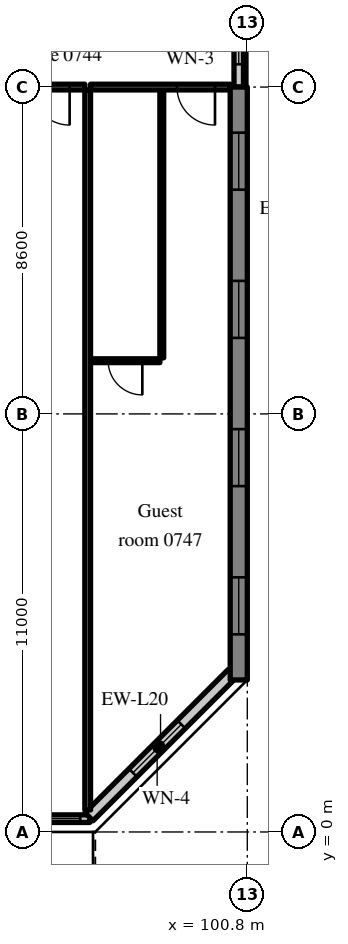
"""IFC4 building model, lengths in metres.
Left out: names, types, materials, properties, quantities, classifications, styles, units other than length and angle.
Written with IfcOpenShell. Run it as: python <this file> out.ifc"""

import sys

from ifc_helpers import new_model, si_unit, direction, frame, frame_2d, origin, place, context, subcontext, project, spatial, rectangle, extrude, source, transform, mapped, element, fill, save


model = new_model("IFC4")
c1 = context("Model", 3, precision=1e-05, world=origin(), true_north=direction((0.0, 1.0)))
c2 = subcontext(c1, "Body", "Model", "MODEL_VIEW")
j1 = project(units=[si_unit("LENGTHUNIT", "METRE"), si_unit("PLANEANGLEUNIT", "RADIAN")], contexts=[c1])
p1 = place(None, origin())
s1 = spatial("IfcSite", under=j1, at=p1, CompositionType="ELEMENT")
p2 = place(p1, origin())
s2 = spatial("IfcBuilding", under=s1, at=p2, CompositionType="ELEMENT")
p3 = place(p2, frame((0.0, 0.0, 35.4)))
s3 = spatial("IfcBuildingStorey", under=s2, at=p3, CompositionType="ELEMENT", Elevation=35.4)
m1 = source(origin(), c2, "Body", "SweptSolid", [
    extrude(rectangle(XDim=15.6, YDim=0.45, at=frame_2d((7.8, 0.0))), origin(), (0.0, 0.0, 1.0), 3.52),
])
p4 = place(p3, frame((100.575, 4.0, 0.0), z_axis=(0.0, 0.0, 1.0), x_axis=(0.0, 1.0, 0.0)))
e1 = element("IfcWall", 1, at=p4, inside=s3, PredefinedType="SHEAR", context=c2, shape_type="MappedRepresentation", body=[
    mapped(m1, transform((0.0, 0.0, 0.0), scale=1.0)),
])
m2 = source(origin(), c2, "Body", "SweptSolid", [
    extrude(rectangle(XDim=1.5, YDim=1.5, at=frame_2d((0.75, 0.75))), frame((0.0, 0.235, 0.0), z_axis=(0.0, -1.0, 0.0), x_axis=(1.0, 0.0, 0.0)), (0.0, 0.0, 1.0), 0.47),
])
p5 = place(p4, frame((1.2, 0.0, 0.9)))
e2 = element("IfcOpeningElement", 2, at=p5, cuts=e1, PredefinedType="OPENING", context=c2, shape_type="MappedRepresentation", body=[
    mapped(m2, transform((0.0, 0.0, 0.0), scale=1.0)),
])
p6 = place(p4, frame((5.1, 0.0, 0.9)))
e3 = element("IfcOpeningElement", 3, at=p6, cuts=e1, PredefinedType="OPENING", context=c2, shape_type="MappedRepresentation", body=[
    mapped(m2, transform((0.0, 0.0, 0.0), scale=1.0)),
])
p7 = place(p4, frame((9.0, 0.0, 0.9)))
e4 = element("IfcOpeningElement", 4, at=p7, cuts=e1, PredefinedType="OPENING", context=c2, shape_type="MappedRepresentation", body=[
    mapped(m2, transform((0.0, 0.0, 0.0), scale=1.0)),
])
p8 = place(p4, frame((12.9, 0.0, 0.9)))
e5 = element("IfcOpeningElement", 5, at=p8, cuts=e1, PredefinedType="OPENING", context=c2, shape_type="MappedRepresentation", body=[
    mapped(m2, transform((0.0, 0.0, 0.0), scale=1.0)),
])
m3 = source(origin(), c2, "Body", "SweptSolid", [
    extrude(rectangle(XDim=4.03, YDim=0.2, at=frame_2d((2.015, 0.0))), origin(), (0.0, 0.0, 1.0), 2.77),
])
p9 = place(p3, frame((92.625, 0.35, 0.0), z_axis=(0.0, 0.0, 1.0), x_axis=(1.0, 0.0, 0.0)))
e6 = element("IfcWall", 6, at=p9, inside=s3, PredefinedType="SOLIDWALL", context=c2, shape_type="MappedRepresentation", body=[
    mapped(m3, transform((0.0, 0.0, 0.0), scale=1.0)),
])
m4 = source(origin(), c2, "Body", "SweptSolid", [
    extrude(rectangle(XDim=1.2, YDim=2.4, at=frame_2d((0.6, 1.2))), frame((0.0, 0.11, 0.0), z_axis=(0.0, -1.0, 0.0), x_axis=(1.0, 0.0, 0.0)), (0.0, 0.0, 1.0), 0.22),
])
p10 = place(p9, frame((0.25, 0.0, 0.0)))
e7 = element("IfcOpeningElement", 7, at=p10, cuts=e6, PredefinedType="OPENING", context=c2, shape_type="MappedRepresentation", body=[
    mapped(m4, transform((0.0, 0.0, 0.0), scale=1.0)),
])
m5 = source(origin(), c2, "Body", "SweptSolid", [
    extrude(rectangle(XDim=1.5, YDim=1.5, at=frame_2d((0.75, 0.75))), frame((0.0, 0.11, 0.0), z_axis=(0.0, -1.0, 0.0), x_axis=(1.0, 0.0, 0.0)), (0.0, 0.0, 1.0), 0.22),
])
p11 = place(p9, frame((2.28, 0.0, 0.9)))
e8 = element("IfcOpeningElement", 8, at=p11, cuts=e6, PredefinedType="OPENING", context=c2, shape_type="MappedRepresentation", body=[
    mapped(m5, transform((0.0, 0.0, 0.0), scale=1.0)),
])
m6 = source(origin(), c2, "Body", "SweptSolid", [
    extrude(rectangle(XDim=5.326, YDim=0.3, at=frame_2d((2.663, 0.0))), origin(), (0.0, 0.0, 1.0), 3.52),
])
p12 = place(p3, frame((96.634, 0.4, 0.0), z_axis=(0.0, 0.0, 1.0), x_axis=(0.707083859269, 0.707129702361, 0.0)))
e9 = element("IfcWall", 9, at=p12, inside=s3, PredefinedType="SOLIDWALL", context=c2, shape_type="MappedRepresentation", body=[
    mapped(m6, transform((0.0, 0.0, 0.0), scale=1.0)),
])
m7 = source(origin(), c2, "Body", "SweptSolid", [
    extrude(rectangle(XDim=1.8, YDim=1.5, at=frame_2d((0.9, 0.75))), frame((0.0, 0.16, 0.0), z_axis=(0.0, -1.0, 0.0), x_axis=(1.0, 0.0, 0.0)), (0.0, 0.0, 1.0), 0.32),
])
p13 = place(p12, frame((1.636, 0.0, 0.9)))
e10 = element("IfcOpeningElement", 10, at=p13, cuts=e9, PredefinedType="OPENING", context=c2, shape_type="MappedRepresentation", body=[
    mapped(m7, transform((0.0, 0.0, 0.0), scale=1.0)),
])
m8 = source(origin(), c2, "Body", "SweptSolid", [
    extrude(rectangle(XDim=2.4, YDim=0.25, at=frame_2d((1.2, 0.0))), origin(), (0.0, 0.0, 1.0), 2.62),
])
p14 = place(p3, frame((100.575, 19.6, 0.0), z_axis=(0.0, 0.0, 1.0), x_axis=(0.0, 1.0, 0.0)))
e11 = element("IfcWall", 11, at=p14, inside=s3, PredefinedType="SOLIDWALL", context=c2, shape_type="MappedRepresentation", body=[
    mapped(m8, transform((0.0, 0.0, 0.0), scale=1.0)),
])
m9 = source(origin(), c2, "Body", "SweptSolid", [
    extrude(rectangle(XDim=1.2, YDim=1.5, at=frame_2d((0.6, 0.75))), frame((0.0, 0.135, 0.0), z_axis=(0.0, -1.0, 0.0), x_axis=(1.0, 0.0, 0.0)), (0.0, 0.0, 1.0), 0.27),
])
p15 = place(p14, frame((0.6, 0.0, 0.9)))
e12 = element("IfcOpeningElement", 12, at=p15, cuts=e11, PredefinedType="OPENING", context=c2, shape_type="MappedRepresentation", body=[
    mapped(m9, transform((0.0, 0.0, 0.0), scale=1.0)),
])
m10 = source(origin(), c2, "Body", "SweptSolid", [
    extrude(rectangle(XDim=3.9, YDim=0.15, at=frame_2d((1.95, 0.0))), origin(), (0.0, 0.0, 1.0), 2.82),
])
p16 = place(p3, frame((92.625, 19.6, 0.0), z_axis=(0.0, 0.0, 1.0), x_axis=(1.0, 0.0, 0.0)))
e13 = element("IfcWall", 13, at=p16, inside=s3, PredefinedType="PARTITIONING", context=c2, shape_type="MappedRepresentation", body=[
    mapped(m10, transform((0.0, 0.0, 0.0), scale=1.0)),
])
m11 = source(origin(), c2, "Body", "SweptSolid", [
    extrude(rectangle(XDim=1.0, YDim=2.1, at=frame_2d((0.5, 1.05))), frame((0.0, 0.085, 0.0), z_axis=(0.0, -1.0, 0.0), x_axis=(1.0, 0.0, 0.0)), (0.0, 0.0, 1.0), 0.17),
])
p17 = place(p16, frame((2.5, 0.0, 0.0)))
e14 = element("IfcOpeningElement", 14, at=p17, cuts=e13, PredefinedType="OPENING", context=c2, shape_type="MappedRepresentation", body=[
    mapped(m11, transform((0.0, 0.0, 0.0), scale=1.0)),
])
m12 = source(origin(), c2, "Body", "SweptSolid", [
    extrude(rectangle(XDim=7.05, YDim=0.1, at=frame_2d((3.525, 0.0))), origin(), (0.0, 0.0, 1.0), 3.52),
])
p18 = place(p3, frame((98.55, 12.475, 0.0), z_axis=(0.0, 0.0, 1.0), x_axis=(0.0, 1.0, 0.0)))
e15 = element("IfcWall", 15, at=p18, inside=s3, PredefinedType="PARTITIONING", context=c2, shape_type="MappedRepresentation", body=[
    mapped(m12, transform((0.0, 0.0, 0.0), scale=1.0)),
])
m13 = source(origin(), c2, "Body", "SweptSolid", [
    extrude(rectangle(XDim=1.825, YDim=0.1, at=frame_2d((0.913, 0.0))), origin(), (0.0, 0.0, 1.0), 3.52),
])
p19 = place(p3, frame((96.675, 12.4, 0.0), z_axis=(0.0, 0.0, 1.0), x_axis=(1.0, 0.0, 0.0)))
e16 = element("IfcWall", 16, at=p19, inside=s3, PredefinedType="PARTITIONING", context=c2, shape_type="MappedRepresentation", body=[
    mapped(m13, transform((0.0, 0.0, 0.0), scale=1.0)),
])
m14 = source(origin(), c2, "Body", "SweptSolid", [
    extrude(rectangle(XDim=0.9, YDim=2.1, at=frame_2d((0.45, 1.05))), frame((0.0, 0.06, 0.0), z_axis=(0.0, -1.0, 0.0), x_axis=(1.0, 0.0, 0.0)), (0.0, 0.0, 1.0), 0.12),
])
p20 = place(p19, frame((0.463, 0.0, 0.0)))
e17 = element("IfcOpeningElement", 17, at=p20, cuts=e16, PredefinedType="OPENING", context=c2, shape_type="MappedRepresentation", body=[
    mapped(m14, transform((0.0, 0.0, 0.0), scale=1.0)),
])
m15 = source(origin(), c2, "Body", "SweptSolid", [
    extrude(rectangle(XDim=3.675, YDim=0.15, at=frame_2d((1.837, 0.0))), origin(), (0.0, 0.0, 1.0), 2.82),
])
p21 = place(p3, frame((96.675, 19.6, 0.0), z_axis=(0.0, 0.0, 1.0), x_axis=(1.0, 0.0, 0.0)))
e18 = element("IfcWall", 18, at=p21, inside=s3, PredefinedType="PARTITIONING", context=c2, shape_type="MappedRepresentation", body=[
    mapped(m15, transform((0.0, 0.0, 0.0), scale=1.0)),
])
p22 = place(p21, frame((2.275, 0.0, 0.0)))
e19 = element("IfcOpeningElement", 19, at=p22, cuts=e18, PredefinedType="OPENING", context=c2, shape_type="MappedRepresentation", body=[
    mapped(m11, transform((0.0, 0.0, 0.0), scale=1.0)),
])
m16 = source(origin(), c2, "Body", "SweptSolid", [
    extrude(rectangle(XDim=18.947, YDim=0.15, at=frame_2d((9.474, 0.0))), origin(), (0.0, 0.0, 1.0), 3.52),
])
p23 = place(p3, frame((96.6, 0.578, 0.0), z_axis=(0.0, 0.0, 1.0), x_axis=(0.0, 1.0, 0.0)))
e20 = element("IfcWall", 20, at=p23, inside=s3, PredefinedType="PARTITIONING", context=c2, shape_type="MappedRepresentation", body=[
    mapped(m16, transform((0.0, 0.0, 0.0), scale=1.0)),
])
m17 = source(origin(), c2, "Body", "SweptSolid", [
    extrude(rectangle(XDim=1.5, YDim=1.5, at=frame_2d((0.75, 0.75))), frame((0.0, 0.03, 0.0), z_axis=(0.0, -1.0, 0.0), x_axis=(1.0, 0.0, 0.0)), (0.0, 0.0, 1.0), 0.06),
])
p24 = place(p11, origin())
e21 = element("IfcWindow", 21, at=p24, inside=s3, PartitioningType="SINGLE_PANEL", PredefinedType="WINDOW", context=c2, shape_type="MappedRepresentation", body=[
    mapped(m17, transform((0.0, 0.0, 0.0), scale=1.0)),
])
fill(e8, e21)
m18 = source(origin(), c2, "Body", "SweptSolid", [
    extrude(rectangle(XDim=1.8, YDim=1.5, at=frame_2d((0.9, 0.75))), frame((0.0, 0.03, 0.0), z_axis=(0.0, -1.0, 0.0), x_axis=(1.0, 0.0, 0.0)), (0.0, 0.0, 1.0), 0.06),
])
p25 = place(p13, origin())
e22 = element("IfcWindow", 22, at=p25, inside=s3, PartitioningType="SINGLE_PANEL", PredefinedType="WINDOW", context=c2, shape_type="MappedRepresentation", body=[
    mapped(m18, transform((0.0, 0.0, 0.0), scale=1.0)),
])
fill(e10, e22)
p26 = place(p5, origin())
e23 = element("IfcWindow", 23, at=p26, inside=s3, PartitioningType="SINGLE_PANEL", PredefinedType="WINDOW", context=c2, shape_type="MappedRepresentation", body=[
    mapped(m17, transform((0.0, 0.0, 0.0), scale=1.0)),
])
fill(e2, e23)
p27 = place(p6, origin())
e24 = element("IfcWindow", 24, at=p27, inside=s3, PartitioningType="SINGLE_PANEL", PredefinedType="WINDOW", context=c2, shape_type="MappedRepresentation", body=[
    mapped(m17, transform((0.0, 0.0, 0.0), scale=1.0)),
])
fill(e3, e24)
p28 = place(p7, origin())
e25 = element("IfcWindow", 25, at=p28, inside=s3, PartitioningType="SINGLE_PANEL", PredefinedType="WINDOW", context=c2, shape_type="MappedRepresentation", body=[
    mapped(m17, transform((0.0, 0.0, 0.0), scale=1.0)),
])
fill(e4, e25)
p29 = place(p8, origin())
e26 = element("IfcWindow", 26, at=p29, inside=s3, PartitioningType="SINGLE_PANEL", PredefinedType="WINDOW", context=c2, shape_type="MappedRepresentation", body=[
    mapped(m17, transform((0.0, 0.0, 0.0), scale=1.0)),
])
fill(e5, e26)
m19 = source(origin(), c2, "Body", "SweptSolid", [
    extrude(rectangle(XDim=1.2, YDim=1.5, at=frame_2d((0.6, 0.75))), frame((0.0, 0.03, 0.0), z_axis=(0.0, -1.0, 0.0), x_axis=(1.0, 0.0, 0.0)), (0.0, 0.0, 1.0), 0.06),
])
p30 = place(p15, origin())
e27 = element("IfcWindow", 27, at=p30, inside=s3, PartitioningType="SINGLE_PANEL", PredefinedType="WINDOW", context=c2, shape_type="MappedRepresentation", body=[
    mapped(m19, transform((0.0, 0.0, 0.0), scale=1.0)),
])
fill(e12, e27)
m20 = source(origin(), c2, "Body", "SweptSolid", [
    extrude(rectangle(XDim=1.0, YDim=2.1, at=frame_2d((0.5, 1.05))), frame((0.0, 0.025, 0.0), z_axis=(0.0, -1.0, 0.0), x_axis=(1.0, 0.0, 0.0)), (0.0, 0.0, 1.0), 0.05),
])
p31 = place(p17, origin())
e28 = element("IfcDoor", 28, at=p31, inside=s3, OperationType="SINGLE_SWING_RIGHT", PredefinedType="DOOR", context=c2, shape_type="MappedRepresentation", body=[
    mapped(m20, transform((0.0, 0.0, 0.0), scale=1.0)),
])
fill(e14, e28)
m21 = source(origin(), c2, "Body", "SweptSolid", [
    extrude(rectangle(XDim=0.9, YDim=2.1, at=frame_2d((0.45, 1.05))), frame((0.0, 0.025, 0.0), z_axis=(0.0, -1.0, 0.0), x_axis=(1.0, 0.0, 0.0)), (0.0, 0.0, 1.0), 0.05),
])
p32 = place(p20, origin())
e29 = element("IfcDoor", 29, at=p32, inside=s3, OperationType="SINGLE_SWING_RIGHT", PredefinedType="DOOR", context=c2, shape_type="MappedRepresentation", body=[
    mapped(m21, transform((0.0, 0.0, 0.0), scale=1.0)),
])
fill(e17, e29)
p33 = place(p22, origin())
e30 = element("IfcDoor", 30, at=p33, inside=s3, OperationType="SINGLE_SWING_RIGHT", PredefinedType="DOOR", context=c2, shape_type="MappedRepresentation", body=[
    mapped(m20, transform((0.0, 0.0, 0.0), scale=1.0)),
])
fill(e19, e30)
save(model, sys.argv[1])
